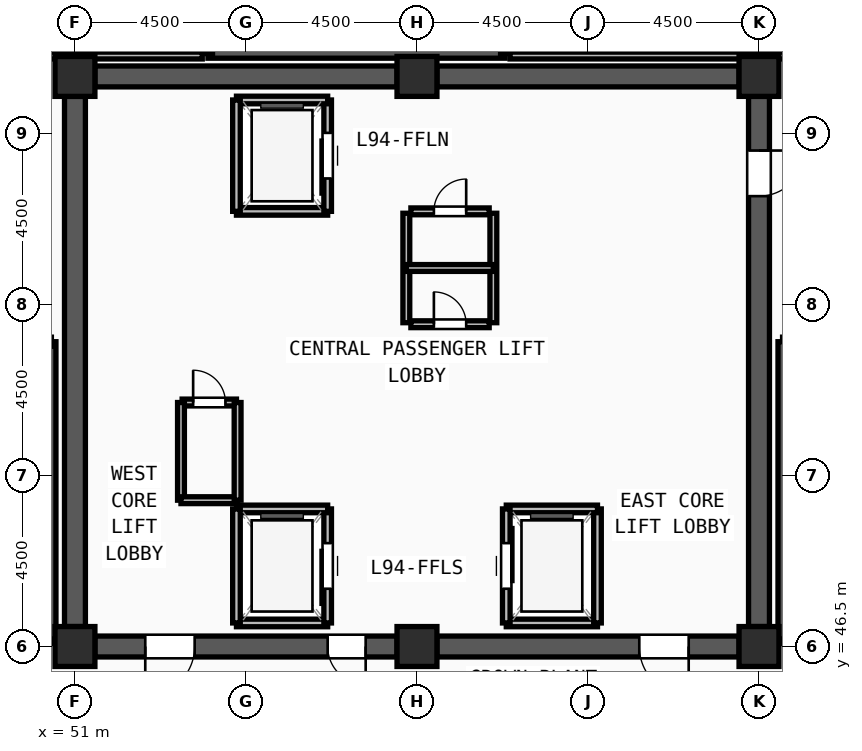
"""IFC4 building model, lengths in metres.
Left out: names, types, materials, properties, quantities, classifications, styles, units other than length and angle.
Written with IfcOpenShell. Run it as: python <this file> out.ifc"""

import sys

from ifc_helpers import new_model, si_unit, direction, frame, frame_2d, origin, origin_2d, place, context, subcontext, project, spatial, rectangle, extrude, source, transform, mapped, element, fill, save


model = new_model("IFC4")
c1 = context("Model", 3, precision=1e-05, world=origin(), true_north=direction((0.0, 1.0)))
c2 = subcontext(c1, "Body", "Model", "MODEL_VIEW")
j1 = project(units=[si_unit("LENGTHUNIT", "METRE"), si_unit("PLANEANGLEUNIT", "RADIAN")], contexts=[c1])
p1 = place(None, origin())
s1 = spatial("IfcSite", under=j1, at=p1, CompositionType="ELEMENT")
p2 = place(p1, origin())
s2 = spatial("IfcBuilding", under=s1, at=p2, CompositionType="ELEMENT")
p3 = place(p2, frame((0.0, 0.0, 366.0)))
s3 = spatial("IfcBuildingStorey", under=s2, at=p3, CompositionType="ELEMENT", Elevation=366.0)
m1 = source(origin(), c2, "Body", "SweptSolid", [
    extrude(rectangle(XDim=1.05, YDim=1.05, at=origin_2d()), origin(), (0.0, 0.0, 1.0), 5.4),
])
for number, where, z_axis, x_axis in (
    (1, (51.0, 46.5, 0.0), (0.0, 0.0, 1.0), (1.0, 0.0, 0.0)),
    (2, (60.0, 46.5, 0.0), (0.0, 0.0, 1.0), (1.0, 0.0, 0.0)),
    (3, (69.0, 46.5, 0.0), (0.0, 0.0, 1.0), (1.0, 0.0, 0.0)),
    (4, (69.0, 61.5, 0.0), (0.0, 0.0, 1.0), (1.0, 0.0, 0.0)),
    (5, (60.0, 61.5, 0.0), (0.0, 0.0, 1.0), (1.0, 0.0, 0.0)),
    (6, (51.0, 61.5, 0.0), (0.0, 0.0, 1.0), (1.0, 0.0, 0.0)),
):
    element("IfcColumn", number, at=place(p3, frame(where, z_axis=z_axis, x_axis=x_axis)), inside=s3, PredefinedType="COLUMN", context=c2, shape_type="MappedRepresentation", body=[
        mapped(m1, transform((0.0, 0.0, 0.0), x_axis=(1.0, 0.0, 0.0), y_axis=(0.0, 1.0, 0.0), z_axis=(0.0, 0.0, 1.0), scale=1.0)),
    ])
for number, where, z_axis, x_axis in (
    (7, (51.525, 61.5, 0.0), (0.0, 0.0, 1.0), (1.0, 0.0, 0.0)),
    (8, (60.525, 61.5, 0.0), (0.0, 0.0, 1.0), (1.0, 0.0, 0.0)),
):
    element("IfcWall", number, at=place(p3, frame(where, z_axis=z_axis, x_axis=x_axis)), inside=s3, PredefinedType="SHEAR", context=c2, shape_type="SweptSolid", body=[
        extrude(rectangle(XDim=7.95, YDim=0.55, at=frame_2d((3.975, 0.0))), origin(), (0.0, 0.0, 1.0), 4.95),
    ])
p4 = place(p3, frame((69.0, 60.975, 0.0), z_axis=(0.0, 0.0, 1.0), x_axis=(0.0, -1.0, 0.0)))
e9 = element("IfcWall", 9, at=p4, inside=s3, PredefinedType="SHEAR", context=c2, shape_type="SweptSolid", body=[
    extrude(rectangle(XDim=13.95, YDim=0.55, at=frame_2d((6.975, 0.0))), origin(), (0.0, 0.0, 1.0), 4.95),
])
m2 = source(origin(), c2, "Body", "SweptSolid", [
    extrude(rectangle(XDim=1.2, YDim=2.2, at=frame_2d((0.6, 1.1))), frame((0.0, 0.285, 0.0), z_axis=(0.0, -1.0, 0.0), x_axis=(1.0, 0.0, 0.0)), (0.0, 0.0, 1.0), 0.57),
])
p5 = place(p4, frame((1.425, 0.0, 0.0)))
e10 = element("IfcOpeningElement", 10, at=p5, cuts=e9, PredefinedType="OPENING", context=c2, shape_type="MappedRepresentation", body=[
    mapped(m2, transform((0.0, 0.0, 0.0), x_axis=(1.0, 0.0, 0.0), y_axis=(0.0, 1.0, 0.0), z_axis=(0.0, 0.0, 1.0), scale=1.0)),
])
p6 = place(p3, frame((68.475, 46.5, 0.0), z_axis=(0.0, 0.0, 1.0), x_axis=(-1.0, 0.0, 0.0)))
e11 = element("IfcWall", 11, at=p6, inside=s3, PredefinedType="SHEAR", context=c2, shape_type="SweptSolid", body=[
    extrude(rectangle(XDim=7.95, YDim=0.55, at=frame_2d((3.975, 0.0))), origin(), (0.0, 0.0, 1.0), 4.95),
])
m3 = source(origin(), c2, "Body", "SweptSolid", [
    extrude(rectangle(XDim=1.3, YDim=2.2, at=frame_2d((0.65, 1.1))), frame((0.0, 0.285, 0.0), z_axis=(0.0, -1.0, 0.0), x_axis=(1.0, 0.0, 0.0)), (0.0, 0.0, 1.0), 0.57),
])
p7 = place(p6, frame((1.325, 0.0, 0.0)))
e12 = element("IfcOpeningElement", 12, at=p7, cuts=e11, PredefinedType="OPENING", context=c2, shape_type="MappedRepresentation", body=[
    mapped(m3, transform((0.0, 0.0, 0.0), x_axis=(1.0, 0.0, 0.0), y_axis=(0.0, 1.0, 0.0), z_axis=(0.0, 0.0, 1.0), scale=1.0)),
])
p8 = place(p3, frame((59.475, 46.5, 0.0), z_axis=(0.0, 0.0, 1.0), x_axis=(-1.0, 0.0, 0.0)))
e13 = element("IfcWall", 13, at=p8, inside=s3, PredefinedType="SHEAR", context=c2, shape_type="SweptSolid", body=[
    extrude(rectangle(XDim=7.95, YDim=0.55, at=frame_2d((3.975, 0.0))), origin(), (0.0, 0.0, 1.0), 4.95),
])
p9 = place(p8, frame((5.325, 0.0, 0.0)))
e14 = element("IfcOpeningElement", 14, at=p9, cuts=e13, PredefinedType="OPENING", context=c2, shape_type="MappedRepresentation", body=[
    mapped(m3, transform((0.0, 0.0, 0.0), x_axis=(1.0, 0.0, 0.0), y_axis=(0.0, 1.0, 0.0), z_axis=(0.0, 0.0, 1.0), scale=1.0)),
])
m4 = source(origin(), c2, "Body", "SweptSolid", [
    extrude(rectangle(XDim=1.0, YDim=2.2, at=frame_2d((0.5, 1.1))), frame((0.0, 0.285, 0.0), z_axis=(0.0, -1.0, 0.0), x_axis=(1.0, 0.0, 0.0)), (0.0, 0.0, 1.0), 0.57),
])
p10 = place(p8, frame((0.825, 0.0, 0.0)))
e15 = element("IfcOpeningElement", 15, at=p10, cuts=e13, PredefinedType="OPENING", context=c2, shape_type="MappedRepresentation", body=[
    mapped(m4, transform((0.0, 0.0, 0.0), x_axis=(1.0, 0.0, 0.0), y_axis=(0.0, 1.0, 0.0), z_axis=(0.0, 0.0, 1.0), scale=1.0)),
])
p11 = place(p3, frame((51.0, 47.025, 0.0), z_axis=(0.0, 0.0, 1.0), x_axis=(0.0, 1.0, 0.0)))
e16 = element("IfcWall", 16, at=p11, inside=s3, PredefinedType="SHEAR", context=c2, shape_type="SweptSolid", body=[
    extrude(rectangle(XDim=13.95, YDim=0.55, at=frame_2d((6.975, 0.0))), origin(), (0.0, 0.0, 1.0), 4.95),
])
for number, where, z_axis, x_axis in (
    (17, (50.38, 46.7, 0.0), (0.0, 0.0, 1.0), (0.0, 1.0, 0.0)),
    (18, (69.62, 54.52, 0.0), (0.0, 0.0, 1.0), (0.0, -1.0, 0.0)),
    (19, (54.5, 62.1, 0.0), (0.0, 0.0, 1.0), (1.0, 0.0, 0.0)),
):
    element("IfcWall", number, at=place(p3, frame(where, z_axis=z_axis, x_axis=x_axis)), inside=s3, PredefinedType="SOLIDWALL", context=c2, shape_type="SweptSolid", body=[
        extrude(rectangle(XDim=7.82, YDim=0.24, at=frame_2d((3.91, 0.0))), origin(), (0.0, 0.0, 1.0), 4.95),
    ])
for number, where, z_axis, x_axis in (
    (20, (62.32, 62.1, 0.0), (0.0, 0.0, 1.0), (0.0, 1.0, 0.0)),
    (21, (54.5, 65.54, 0.0), (0.0, 0.0, 1.0), (0.0, -1.0, 0.0)),
):
    element("IfcWall", number, at=place(p3, frame(where, z_axis=z_axis, x_axis=x_axis)), inside=s3, PredefinedType="SOLIDWALL", context=c2, shape_type="SweptSolid", body=[
        extrude(rectangle(XDim=3.44, YDim=0.24, at=frame_2d((1.72, 0.0))), origin(), (0.0, 0.0, 1.0), 4.95),
    ])
p12 = place(p3, frame((55.25, 47.12, 0.0), z_axis=(0.0, 0.0, 1.0), x_axis=(1.0, 0.0, 0.0)))
e22 = element("IfcWall", 22, at=p12, inside=s3, PredefinedType="SOLIDWALL", context=c2, shape_type="SweptSolid", body=[
    extrude(rectangle(XDim=2.4, YDim=0.2, at=frame_2d((1.2, 0.0))), origin(), (0.0, 0.0, 1.0), 4.95),
])
p13 = place(p3, frame((57.65, 47.12, 0.0), z_axis=(0.0, 0.0, 1.0), x_axis=(0.0, 1.0, 0.0)))
e23 = element("IfcWall", 23, at=p13, inside=s3, PredefinedType="SOLIDWALL", context=c2, shape_type="SweptSolid", body=[
    extrude(rectangle(XDim=3.0, YDim=0.2, at=frame_2d((1.5, 0.0))), origin(), (0.0, 0.0, 1.0), 4.95),
])
m5 = source(origin(), c2, "Body", "SweptSolid", [
    extrude(rectangle(XDim=1.2, YDim=2.3, at=frame_2d((0.6, 1.15))), frame((0.0, 0.11, 0.0), z_axis=(0.0, -1.0, 0.0), x_axis=(1.0, 0.0, 0.0)), (0.0, 0.0, 1.0), 0.22),
])
p14 = place(p13, frame((0.9, 0.0, 0.0)))
e24 = element("IfcOpeningElement", 24, at=p14, cuts=e23, PredefinedType="OPENING", context=c2, shape_type="MappedRepresentation", body=[
    mapped(m5, transform((0.0, 0.0, 0.0), x_axis=(1.0, 0.0, 0.0), y_axis=(0.0, 1.0, 0.0), z_axis=(0.0, 0.0, 1.0), scale=1.0)),
])
p15 = place(p3, frame((57.65, 50.12, 0.0), z_axis=(0.0, 0.0, 1.0), x_axis=(-1.0, 0.0, 0.0)))
e25 = element("IfcWall", 25, at=p15, inside=s3, PredefinedType="SOLIDWALL", context=c2, shape_type="SweptSolid", body=[
    extrude(rectangle(XDim=2.4, YDim=0.2, at=frame_2d((1.2, 0.0))), origin(), (0.0, 0.0, 1.0), 4.95),
])
p16 = place(p3, frame((55.25, 50.12, 0.0), z_axis=(0.0, 0.0, 1.0), x_axis=(0.0, -1.0, 0.0)))
e26 = element("IfcWall", 26, at=p16, inside=s3, PredefinedType="SOLIDWALL", context=c2, shape_type="SweptSolid", body=[
    extrude(rectangle(XDim=3.0, YDim=0.2, at=frame_2d((1.5, 0.0))), origin(), (0.0, 0.0, 1.0), 4.95),
])
p17 = place(p3, frame((62.35, 47.12, 0.0), z_axis=(0.0, 0.0, 1.0), x_axis=(1.0, 0.0, 0.0)))
e27 = element("IfcWall", 27, at=p17, inside=s3, PredefinedType="SOLIDWALL", context=c2, shape_type="SweptSolid", body=[
    extrude(rectangle(XDim=2.4, YDim=0.2, at=frame_2d((1.2, 0.0))), origin(), (0.0, 0.0, 1.0), 4.95),
])
p18 = place(p3, frame((64.75, 47.12, 0.0), z_axis=(0.0, 0.0, 1.0), x_axis=(0.0, 1.0, 0.0)))
e28 = element("IfcWall", 28, at=p18, inside=s3, PredefinedType="SOLIDWALL", context=c2, shape_type="SweptSolid", body=[
    extrude(rectangle(XDim=3.0, YDim=0.2, at=frame_2d((1.5, 0.0))), origin(), (0.0, 0.0, 1.0), 4.95),
])
p19 = place(p3, frame((64.75, 50.12, 0.0), z_axis=(0.0, 0.0, 1.0), x_axis=(-1.0, 0.0, 0.0)))
e29 = element("IfcWall", 29, at=p19, inside=s3, PredefinedType="SOLIDWALL", context=c2, shape_type="SweptSolid", body=[
    extrude(rectangle(XDim=2.4, YDim=0.2, at=frame_2d((1.2, 0.0))), origin(), (0.0, 0.0, 1.0), 4.95),
])
p20 = place(p3, frame((62.35, 50.12, 0.0), z_axis=(0.0, 0.0, 1.0), x_axis=(0.0, -1.0, 0.0)))
e30 = element("IfcWall", 30, at=p20, inside=s3, PredefinedType="SOLIDWALL", context=c2, shape_type="SweptSolid", body=[
    extrude(rectangle(XDim=3.0, YDim=0.2, at=frame_2d((1.5, 0.0))), origin(), (0.0, 0.0, 1.0), 4.95),
])
p21 = place(p20, frame((0.9, 0.0, 0.0)))
e31 = element("IfcOpeningElement", 31, at=p21, cuts=e30, PredefinedType="OPENING", context=c2, shape_type="MappedRepresentation", body=[
    mapped(m5, transform((0.0, 0.0, 0.0), x_axis=(1.0, 0.0, 0.0), y_axis=(0.0, 1.0, 0.0), z_axis=(0.0, 0.0, 1.0), scale=1.0)),
])
p22 = place(p3, frame((55.25, 57.95, 0.0), z_axis=(0.0, 0.0, 1.0), x_axis=(1.0, 0.0, 0.0)))
e32 = element("IfcWall", 32, at=p22, inside=s3, PredefinedType="SOLIDWALL", context=c2, shape_type="SweptSolid", body=[
    extrude(rectangle(XDim=2.4, YDim=0.2, at=frame_2d((1.2, 0.0))), origin(), (0.0, 0.0, 1.0), 4.95),
])
p23 = place(p3, frame((57.65, 57.95, 0.0), z_axis=(0.0, 0.0, 1.0), x_axis=(0.0, 1.0, 0.0)))
e33 = element("IfcWall", 33, at=p23, inside=s3, PredefinedType="SOLIDWALL", context=c2, shape_type="SweptSolid", body=[
    extrude(rectangle(XDim=2.93, YDim=0.2, at=frame_2d((1.465, 0.0))), origin(), (0.0, 0.0, 1.0), 4.95),
])
p24 = place(p23, frame((0.865, 0.0, 0.0)))
e34 = element("IfcOpeningElement", 34, at=p24, cuts=e33, PredefinedType="OPENING", context=c2, shape_type="MappedRepresentation", body=[
    mapped(m5, transform((0.0, 0.0, 0.0), x_axis=(1.0, 0.0, 0.0), y_axis=(0.0, 1.0, 0.0), z_axis=(0.0, 0.0, 1.0), scale=1.0)),
])
p25 = place(p3, frame((57.65, 60.88, 0.0), z_axis=(0.0, 0.0, 1.0), x_axis=(-1.0, 0.0, 0.0)))
e35 = element("IfcWall", 35, at=p25, inside=s3, PredefinedType="SOLIDWALL", context=c2, shape_type="SweptSolid", body=[
    extrude(rectangle(XDim=2.4, YDim=0.2, at=frame_2d((1.2, 0.0))), origin(), (0.0, 0.0, 1.0), 4.95),
])
p26 = place(p3, frame((55.25, 60.88, 0.0), z_axis=(0.0, 0.0, 1.0), x_axis=(0.0, -1.0, 0.0)))
e36 = element("IfcWall", 36, at=p26, inside=s3, PredefinedType="SOLIDWALL", context=c2, shape_type="SweptSolid", body=[
    extrude(rectangle(XDim=2.93, YDim=0.2, at=frame_2d((1.465, 0.0))), origin(), (0.0, 0.0, 1.0), 4.95),
])
p27 = place(p3, frame((59.84, 54.98, 0.0), z_axis=(0.0, 0.0, 1.0), x_axis=(1.0, 0.0, 0.0)))
e37 = element("IfcWall", 37, at=p27, inside=s3, PredefinedType="PARTITIONING", context=c2, shape_type="SweptSolid", body=[
    extrude(rectangle(XDim=2.06, YDim=0.18, at=frame_2d((1.03, 0.0))), origin(), (0.0, 0.0, 1.0), 4.95),
])
m6 = source(origin(), c2, "Body", "SweptSolid", [
    extrude(rectangle(XDim=0.85, YDim=2.1, at=frame_2d((0.425, 1.05))), frame((0.0, 0.1, 0.0), z_axis=(0.0, -1.0, 0.0), x_axis=(1.0, 0.0, 0.0)), (0.0, 0.0, 1.0), 0.2),
])
p28 = place(p27, frame((0.605, 0.0, 0.0)))
e38 = element("IfcOpeningElement", 38, at=p28, cuts=e37, PredefinedType="OPENING", context=c2, shape_type="MappedRepresentation", body=[
    mapped(m6, transform((0.0, 0.0, 0.0), x_axis=(1.0, 0.0, 0.0), y_axis=(0.0, 1.0, 0.0), z_axis=(0.0, 0.0, 1.0), scale=1.0)),
])
p29 = place(p3, frame((59.84, 57.95, 0.0), z_axis=(0.0, 0.0, 1.0), x_axis=(1.0, 0.0, 0.0)))
e39 = element("IfcWall", 39, at=p29, inside=s3, PredefinedType="PARTITIONING", context=c2, shape_type="SweptSolid", body=[
    extrude(rectangle(XDim=2.06, YDim=0.18, at=frame_2d((1.03, 0.0))), origin(), (0.0, 0.0, 1.0), 4.95),
])
p30 = place(p29, frame((0.605, 0.0, 0.0)))
e40 = element("IfcOpeningElement", 40, at=p30, cuts=e39, PredefinedType="OPENING", context=c2, shape_type="MappedRepresentation", body=[
    mapped(m6, transform((0.0, 0.0, 0.0), x_axis=(1.0, 0.0, 0.0), y_axis=(0.0, 1.0, 0.0), z_axis=(0.0, 0.0, 1.0), scale=1.0)),
])
p31 = place(p3, frame((53.82, 52.92, 0.0), z_axis=(0.0, 0.0, 1.0), x_axis=(1.0, 0.0, 0.0)))
e41 = element("IfcWall", 41, at=p31, inside=s3, PredefinedType="PARTITIONING", context=c2, shape_type="SweptSolid", body=[
    extrude(rectangle(XDim=1.43, YDim=0.18, at=frame_2d((0.715, 0.0))), origin(), (0.0, 0.0, 1.0), 4.95),
])
p32 = place(p31, frame((0.29, 0.0, 0.0)))
e42 = element("IfcOpeningElement", 42, at=p32, cuts=e41, PredefinedType="OPENING", context=c2, shape_type="MappedRepresentation", body=[
    mapped(m6, transform((0.0, 0.0, 0.0), x_axis=(1.0, 0.0, 0.0), y_axis=(0.0, 1.0, 0.0), z_axis=(0.0, 0.0, 1.0), scale=1.0)),
])
for number, where, z_axis, x_axis in (
    (43, (59.72, 55.02, 0.0), (0.0, 0.0, 1.0), (0.0, 1.0, 0.0)),
    (44, (62.01, 55.02, 0.0), (0.0, 0.0, 1.0), (0.0, 1.0, 0.0)),
):
    element("IfcWall", number, at=place(p3, frame(where, z_axis=z_axis, x_axis=x_axis)), inside=s3, PredefinedType="PARTITIONING", context=c2, shape_type="SweptSolid", body=[
        extrude(rectangle(XDim=2.88, YDim=0.18, at=frame_2d((1.44, 0.0))), origin(), (0.0, 0.0, 1.0), 4.95),
    ])
p33 = place(p3, frame((59.72, 56.46, 0.0), z_axis=(0.0, 0.0, 1.0), x_axis=(1.0, 0.0, 0.0)))
e45 = element("IfcWall", 45, at=p33, inside=s3, PredefinedType="PARTITIONING", context=c2, shape_type="SweptSolid", body=[
    extrude(rectangle(XDim=2.29, YDim=0.18, at=frame_2d((1.145, 0.0))), origin(), (0.0, 0.0, 1.0), 4.95),
])
p34 = place(p3, frame((53.79, 50.35, 0.0), z_axis=(0.0, 0.0, 1.0), x_axis=(0.0, 1.0, 0.0)))
e46 = element("IfcWall", 46, at=p34, inside=s3, PredefinedType="PARTITIONING", context=c2, shape_type="SweptSolid", body=[
    extrude(rectangle(XDim=2.57, YDim=0.18, at=frame_2d((1.285, 0.0))), origin(), (0.0, 0.0, 1.0), 4.95),
])
p35 = place(p3, frame((53.79, 50.35, 0.0), z_axis=(0.0, 0.0, 1.0), x_axis=(1.0, 0.0, 0.0)))
e47 = element("IfcWall", 47, at=p35, inside=s3, PredefinedType="PARTITIONING", context=c2, shape_type="SweptSolid", body=[
    extrude(rectangle(XDim=1.49, YDim=0.18, at=frame_2d((0.745, 0.0))), origin(), (0.0, 0.0, 1.0), 4.95),
])
p36 = place(p3, frame((55.28, 50.35, 0.0), z_axis=(0.0, 0.0, 1.0), x_axis=(0.0, 1.0, 0.0)))
e48 = element("IfcWall", 48, at=p36, inside=s3, PredefinedType="PARTITIONING", context=c2, shape_type="SweptSolid", body=[
    extrude(rectangle(XDim=2.57, YDim=0.18, at=frame_2d((1.285, 0.0))), origin(), (0.0, 0.0, 1.0), 4.95),
])
p37 = place(p3, frame((46.92, 62.05, 0.0), z_axis=(0.0, 0.0, 1.0), x_axis=(1.0, 0.0, 0.0)))
e49 = element("IfcWall", 49, at=p37, inside=s3, PredefinedType="PARTITIONING", context=c2, shape_type="SweptSolid", body=[
    extrude(rectangle(XDim=7.43, YDim=0.18, at=frame_2d((3.715, 0.0))), origin(), (0.0, 0.0, 1.0), 4.235),
])
p38 = place(p3, frame((62.45, 62.05, 0.0), z_axis=(0.0, 0.0, 1.0), x_axis=(1.0, 0.0, 0.0)))
e50 = element("IfcWall", 50, at=p38, inside=s3, PredefinedType="PARTITIONING", context=c2, shape_type="SweptSolid", body=[
    extrude(rectangle(XDim=10.63, YDim=0.18, at=frame_2d((5.315, 0.0))), origin(), (0.0, 0.0, 1.0), 4.235),
])
m7 = source(origin(), c2, "Body", "SweptSolid", [
    extrude(rectangle(XDim=1.3, YDim=2.2, at=frame_2d((0.65, 1.1))), frame((0.0, 0.025, 0.0), z_axis=(0.0, -1.0, 0.0), x_axis=(1.0, 0.0, 0.0)), (0.0, 0.0, 1.0), 0.05),
])
p39 = place(p9, origin())
e51 = element("IfcDoor", 51, at=p39, inside=s3, OperationType="SINGLE_SWING_RIGHT", PredefinedType="DOOR", context=c2, shape_type="MappedRepresentation", body=[
    mapped(m7, transform((0.0, 0.0, 0.0), x_axis=(1.0, 0.0, 0.0), y_axis=(0.0, 1.0, 0.0), z_axis=(0.0, 0.0, 1.0), scale=1.0)),
])
fill(e14, e51)
m8 = source(origin(), c2, "Body", "SweptSolid", [
    extrude(rectangle(XDim=1.0, YDim=2.2, at=frame_2d((0.5, 1.1))), frame((0.0, 0.025, 0.0), z_axis=(0.0, -1.0, 0.0), x_axis=(1.0, 0.0, 0.0)), (0.0, 0.0, 1.0), 0.05),
])
p40 = place(p10, origin())
e52 = element("IfcDoor", 52, at=p40, inside=s3, OperationType="SINGLE_SWING_LEFT", PredefinedType="DOOR", context=c2, shape_type="MappedRepresentation", body=[
    mapped(m8, transform((0.0, 0.0, 0.0), x_axis=(1.0, 0.0, 0.0), y_axis=(0.0, 1.0, 0.0), z_axis=(0.0, 0.0, 1.0), scale=1.0)),
])
fill(e15, e52)
p41 = place(p7, origin())
e53 = element("IfcDoor", 53, at=p41, inside=s3, OperationType="SINGLE_SWING_LEFT", PredefinedType="DOOR", context=c2, shape_type="MappedRepresentation", body=[
    mapped(m7, transform((0.0, 0.0, 0.0), x_axis=(1.0, 0.0, 0.0), y_axis=(0.0, 1.0, 0.0), z_axis=(0.0, 0.0, 1.0), scale=1.0)),
])
fill(e12, e53)
m9 = source(origin(), c2, "Body", "SweptSolid", [
    extrude(rectangle(XDim=1.2, YDim=2.2, at=frame_2d((0.6, 1.1))), frame((0.0, 0.025, 0.0), z_axis=(0.0, -1.0, 0.0), x_axis=(1.0, 0.0, 0.0)), (0.0, 0.0, 1.0), 0.05),
])
p42 = place(p5, origin())
e54 = element("IfcDoor", 54, at=p42, inside=s3, OperationType="SINGLE_SWING_LEFT", PredefinedType="DOOR", context=c2, shape_type="MappedRepresentation", body=[
    mapped(m9, transform((0.0, 0.0, 0.0), x_axis=(1.0, 0.0, 0.0), y_axis=(0.0, 1.0, 0.0), z_axis=(0.0, 0.0, 1.0), scale=1.0)),
])
fill(e10, e54)
m10 = source(origin(), c2, "Body", "SweptSolid", [
    extrude(rectangle(XDim=1.2, YDim=2.3, at=frame_2d((0.6, 1.15))), frame((0.0, 0.025, 0.0), z_axis=(0.0, -1.0, 0.0), x_axis=(1.0, 0.0, 0.0)), (0.0, 0.0, 1.0), 0.05),
])
p43 = place(p14, origin())
e55 = element("IfcDoor", 55, at=p43, inside=s3, OperationType="SLIDING_TO_LEFT", PredefinedType="DOOR", context=c2, shape_type="MappedRepresentation", body=[
    mapped(m10, transform((0.0, 0.0, 0.0), x_axis=(1.0, 0.0, 0.0), y_axis=(0.0, 1.0, 0.0), z_axis=(0.0, 0.0, 1.0), scale=1.0)),
])
fill(e24, e55)
p44 = place(p21, origin())
e56 = element("IfcDoor", 56, at=p44, inside=s3, OperationType="SLIDING_TO_LEFT", PredefinedType="DOOR", context=c2, shape_type="MappedRepresentation", body=[
    mapped(m10, transform((0.0, 0.0, 0.0), x_axis=(1.0, 0.0, 0.0), y_axis=(0.0, 1.0, 0.0), z_axis=(0.0, 0.0, 1.0), scale=1.0)),
])
fill(e31, e56)
p45 = place(p24, origin())
e57 = element("IfcDoor", 57, at=p45, inside=s3, OperationType="SLIDING_TO_LEFT", PredefinedType="DOOR", context=c2, shape_type="MappedRepresentation", body=[
    mapped(m10, transform((0.0, 0.0, 0.0), x_axis=(1.0, 0.0, 0.0), y_axis=(0.0, 1.0, 0.0), z_axis=(0.0, 0.0, 1.0), scale=1.0)),
])
fill(e34, e57)
m11 = source(origin(), c2, "Body", "SweptSolid", [
    extrude(rectangle(XDim=0.85, YDim=2.1, at=frame_2d((0.425, 1.05))), frame((0.0, 0.025, 0.0), z_axis=(0.0, -1.0, 0.0), x_axis=(1.0, 0.0, 0.0)), (0.0, 0.0, 1.0), 0.05),
])
p46 = place(p28, origin())
e58 = element("IfcDoor", 58, at=p46, inside=s3, OperationType="SINGLE_SWING_LEFT", PredefinedType="DOOR", context=c2, shape_type="MappedRepresentation", body=[
    mapped(m11, transform((0.0, 0.0, 0.0), x_axis=(1.0, 0.0, 0.0), y_axis=(0.0, 1.0, 0.0), z_axis=(0.0, 0.0, 1.0), scale=1.0)),
])
fill(e38, e58)
p47 = place(p30, origin())
e59 = element("IfcDoor", 59, at=p47, inside=s3, OperationType="SINGLE_SWING_RIGHT", PredefinedType="DOOR", context=c2, shape_type="MappedRepresentation", body=[
    mapped(m11, transform((0.0, 0.0, 0.0), x_axis=(1.0, 0.0, 0.0), y_axis=(0.0, 1.0, 0.0), z_axis=(0.0, 0.0, 1.0), scale=1.0)),
])
fill(e40, e59)
p48 = place(p32, origin())
e60 = element("IfcDoor", 60, at=p48, inside=s3, OperationType="SINGLE_SWING_LEFT", PredefinedType="DOOR", context=c2, shape_type="MappedRepresentation", body=[
    mapped(m11, transform((0.0, 0.0, 0.0), x_axis=(1.0, 0.0, 0.0), y_axis=(0.0, 1.0, 0.0), z_axis=(0.0, 0.0, 1.0), scale=1.0)),
])
fill(e42, e60)
save(model, sys.argv[1])
